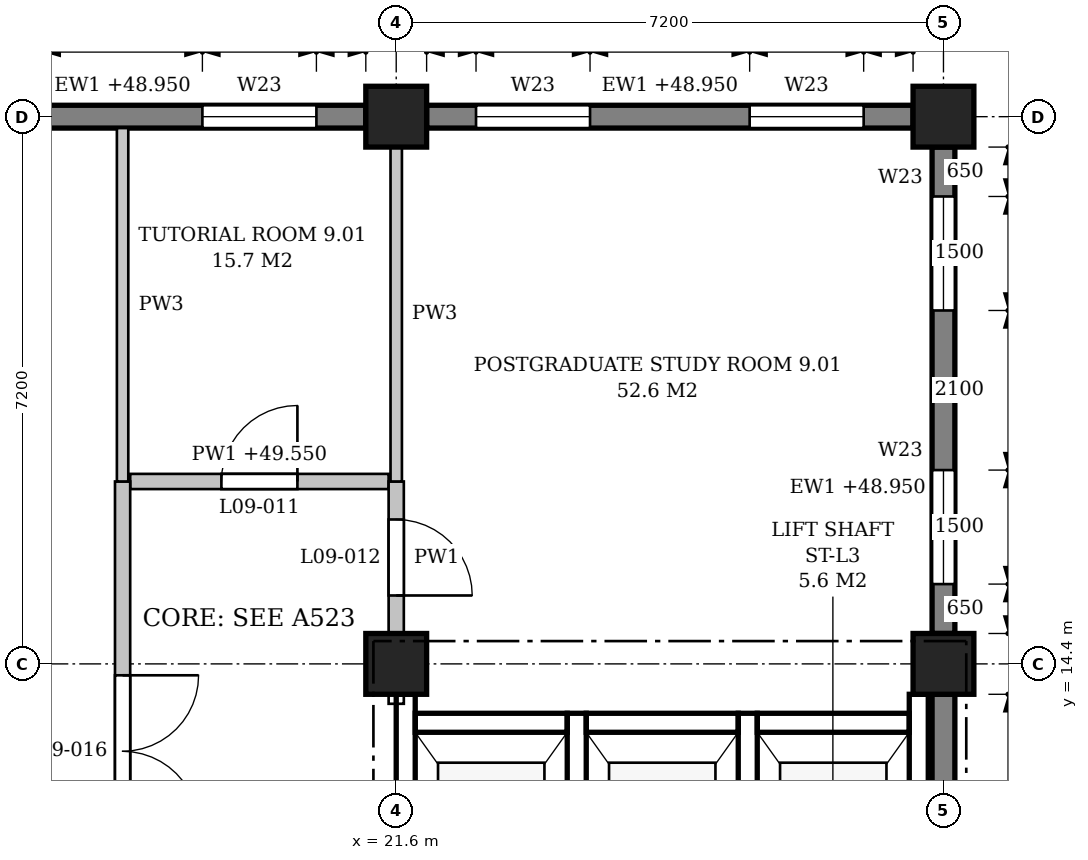
"""IFC4 building model, lengths in metres.
Left out: names, types, materials, properties, quantities, classifications, styles, units other than length and angle.
Written with IfcOpenShell. Run it as: python <this file> out.ifc"""

import sys

from ifc_helpers import new_model, si_unit, direction, frame, frame_2d, origin, origin_2d, place, context, subcontext, project, spatial, polyline, rectangle, outline, extrude, element, fill, save


model = new_model("IFC4")
c1 = context("Model", 3, precision=1e-05, world=origin(), true_north=direction((0.0, 1.0)))
c2 = subcontext(c1, "Body", "Model", "MODEL_VIEW")
j1 = project(units=[si_unit("LENGTHUNIT", "METRE"), si_unit("PLANEANGLEUNIT", "RADIAN")], contexts=[c1])
p1 = place(None, origin())
s1 = spatial("IfcSite", under=j1, at=p1, CompositionType="ELEMENT")
p2 = place(p1, origin())
s2 = spatial("IfcBuilding", under=s1, at=p2, CompositionType="ELEMENT")
p3 = place(p2, frame((0.0, 0.0, 45.3)))
s3 = spatial("IfcBuildingStorey", under=s2, at=p3, CompositionType="ELEMENT", Elevation=45.3)
for number, where, z_axis, x_axis in (
    (1, (21.6, 14.4, 0.0), (0.0, 0.0, 1.0), (1.0, 0.0, 0.0)),
    (2, (21.6, 21.6, 0.0), (0.0, 0.0, 1.0), (1.0, 0.0, 0.0)),
    (3, (28.8, 14.4, 0.0), (0.0, 0.0, 1.0), (1.0, 0.0, 0.0)),
    (4, (28.8, 21.6, 0.0), (0.0, 0.0, 1.0), (1.0, 0.0, 0.0)),
):
    element("IfcColumn", number, at=place(p3, frame(where, z_axis=z_axis, x_axis=x_axis)), inside=s3, PredefinedType="COLUMN", context=c2, shape_type="SweptSolid", body=[
        extrude(rectangle(XDim=0.8, YDim=0.8, at=origin_2d()), origin(), (0.0, 0.0, 1.0), 4.5),
    ])
p4 = place(p3, frame((28.8, 7.6, 0.0), z_axis=(0.0, 0.0, 1.0), x_axis=(0.0, 1.0, 0.0)))
e5 = element("IfcWall", 5, at=p4, inside=s3, PredefinedType="STANDARD", context=c2, shape_type="SweptSolid", body=[
    extrude(rectangle(XDim=6.4, YDim=0.3, at=frame_2d((3.2, 0.0))), origin(), (0.0, 0.0, 1.0), 3.65),
])
p5 = place(p4, frame((0.65, 0.0, 0.9)))
e6 = element("IfcOpeningElement", 6, at=p5, cuts=e5, PredefinedType="OPENING", context=c2, shape_type="SweptSolid", body=[
    extrude(outline(polyline([(0.0, 0.0), (1.5, 0.0), (1.5, 1.95), (0.75, 2.7), (0.0, 1.95), (0.0, 0.0)])), frame((0.0, 0.16, 0.0), z_axis=(0.0, -1.0, 0.0), x_axis=(1.0, 0.0, 0.0)), (0.0, 0.0, 1.0), 0.32),
])
p6 = place(p3, frame((28.8, 14.8, 0.0), z_axis=(0.0, 0.0, 1.0), x_axis=(0.0, 1.0, 0.0)))
e7 = element("IfcWall", 7, at=p6, inside=s3, PredefinedType="STANDARD", context=c2, shape_type="SweptSolid", body=[
    extrude(rectangle(XDim=6.4, YDim=0.3, at=frame_2d((3.2, 0.0))), origin(), (0.0, 0.0, 1.0), 3.65),
])
p7 = place(p6, frame((0.65, 0.0, 0.9)))
e8 = element("IfcOpeningElement", 8, at=p7, cuts=e7, PredefinedType="OPENING", context=c2, shape_type="SweptSolid", body=[
    extrude(outline(polyline([(0.0, 0.0), (1.5, 0.0), (1.5, 1.95), (0.75, 2.7), (0.0, 1.95), (0.0, 0.0)])), frame((0.0, 0.16, 0.0), z_axis=(0.0, -1.0, 0.0), x_axis=(1.0, 0.0, 0.0)), (0.0, 0.0, 1.0), 0.32),
])
p8 = place(p6, frame((4.25, 0.0, 0.9)))
e9 = element("IfcOpeningElement", 9, at=p8, cuts=e7, PredefinedType="OPENING", context=c2, shape_type="SweptSolid", body=[
    extrude(outline(polyline([(0.0, 0.0), (1.5, 0.0), (1.5, 1.95), (0.75, 2.7), (0.0, 1.95), (0.0, 0.0)])), frame((0.0, 0.16, 0.0), z_axis=(0.0, -1.0, 0.0), x_axis=(1.0, 0.0, 0.0)), (0.0, 0.0, 1.0), 0.32),
])
p9 = place(p3, frame((28.4, 21.6, 0.0), z_axis=(0.0, 0.0, 1.0), x_axis=(-1.0, 0.0, 0.0)))
e10 = element("IfcWall", 10, at=p9, inside=s3, PredefinedType="STANDARD", context=c2, shape_type="SweptSolid", body=[
    extrude(rectangle(XDim=6.4, YDim=0.3, at=frame_2d((3.2, 0.0))), origin(), (0.0, 0.0, 1.0), 3.65),
])
p10 = place(p9, frame((0.65, 0.0, 0.9)))
e11 = element("IfcOpeningElement", 11, at=p10, cuts=e10, PredefinedType="OPENING", context=c2, shape_type="SweptSolid", body=[
    extrude(outline(polyline([(0.0, 0.0), (1.5, 0.0), (1.5, 1.95), (0.75, 2.7), (0.0, 1.95), (0.0, 0.0)])), frame((0.0, 0.16, 0.0), z_axis=(0.0, -1.0, 0.0), x_axis=(1.0, 0.0, 0.0)), (0.0, 0.0, 1.0), 0.32),
])
p11 = place(p9, frame((4.25, 0.0, 0.9)))
e12 = element("IfcOpeningElement", 12, at=p11, cuts=e10, PredefinedType="OPENING", context=c2, shape_type="SweptSolid", body=[
    extrude(outline(polyline([(0.0, 0.0), (1.5, 0.0), (1.5, 1.95), (0.75, 2.7), (0.0, 1.95), (0.0, 0.0)])), frame((0.0, 0.16, 0.0), z_axis=(0.0, -1.0, 0.0), x_axis=(1.0, 0.0, 0.0)), (0.0, 0.0, 1.0), 0.32),
])
p12 = place(p3, frame((21.2, 21.6, 0.0), z_axis=(0.0, 0.0, 1.0), x_axis=(-1.0, 0.0, 0.0)))
e13 = element("IfcWall", 13, at=p12, inside=s3, PredefinedType="STANDARD", context=c2, shape_type="SweptSolid", body=[
    extrude(rectangle(XDim=6.4, YDim=0.3, at=frame_2d((3.2, 0.0))), origin(), (0.0, 0.0, 1.0), 3.65),
])
p13 = place(p12, frame((0.65, 0.0, 0.9)))
e14 = element("IfcOpeningElement", 14, at=p13, cuts=e13, PredefinedType="OPENING", context=c2, shape_type="SweptSolid", body=[
    extrude(outline(polyline([(0.0, 0.0), (1.5, 0.0), (1.5, 1.95), (0.75, 2.7), (0.0, 1.95), (0.0, 0.0)])), frame((0.0, 0.16, 0.0), z_axis=(0.0, -1.0, 0.0), x_axis=(1.0, 0.0, 0.0)), (0.0, 0.0, 1.0), 0.32),
])
p14 = place(p12, frame((4.25, 0.0, 0.9)))
e15 = element("IfcOpeningElement", 15, at=p14, cuts=e13, PredefinedType="OPENING", context=c2, shape_type="SweptSolid", body=[
    extrude(outline(polyline([(0.0, 0.0), (1.5, 0.0), (1.5, 1.95), (0.75, 2.7), (0.0, 1.95), (0.0, 0.0)])), frame((0.0, 0.16, 0.0), z_axis=(0.0, -1.0, 0.0), x_axis=(1.0, 0.0, 0.0)), (0.0, 0.0, 1.0), 0.32),
])
p15 = place(p3, frame((21.725, 10.45, -0.25), z_axis=(0.0, 0.0, 1.0), x_axis=(0.0, 1.0, 0.0)))
e16 = element("IfcWall", 16, at=p15, inside=s3, PredefinedType="SHEAR", context=c2, shape_type="SweptSolid", body=[
    extrude(rectangle(XDim=3.55, YDim=0.25, at=frame_2d((1.775, 0.0))), origin(), (0.0, 0.0, 1.0), 3.8),
])
for number, where, z_axis, x_axis in (
    (17, (23.975, 10.45, -0.25), (0.0, 0.0, 1.0), (0.0, 1.0, 0.0)),
    (18, (26.225, 10.45, -0.25), (0.0, 0.0, 1.0), (0.0, 1.0, 0.0)),
):
    element("IfcWall", number, at=place(p3, frame(where, z_axis=z_axis, x_axis=x_axis)), inside=s3, PredefinedType="SHEAR", context=c2, shape_type="SweptSolid", body=[
        extrude(rectangle(XDim=3.3, YDim=0.25, at=frame_2d((1.65, 0.0))), origin(), (0.0, 0.0, 1.0), 4.5),
    ])
p16 = place(p3, frame((28.475, 10.45, -0.25), z_axis=(0.0, 0.0, 1.0), x_axis=(0.0, 1.0, 0.0)))
e19 = element("IfcWall", 19, at=p16, inside=s3, PredefinedType="SHEAR", context=c2, shape_type="SweptSolid", body=[
    extrude(rectangle(XDim=3.55, YDim=0.25, at=frame_2d((1.775, 0.0))), origin(), (0.0, 0.0, 1.0), 4.5),
])
for number, where, z_axis, x_axis in (
    (20, (21.85, 13.625, -0.25), (0.0, 0.0, 1.0), (1.0, 0.0, 0.0)),
    (21, (24.1, 13.625, -0.25), (0.0, 0.0, 1.0), (1.0, 0.0, 0.0)),
    (22, (26.35, 13.625, -0.25), (0.0, 0.0, 1.0), (1.0, 0.0, 0.0)),
):
    element("IfcWall", number, at=place(p3, frame(where, z_axis=z_axis, x_axis=x_axis)), inside=s3, PredefinedType="SHEAR", context=c2, shape_type="SweptSolid", body=[
        extrude(rectangle(XDim=2.0, YDim=0.25, at=frame_2d((1.0, 0.0))), origin(), (0.0, 0.0, 1.0), 4.5),
    ])
p17 = place(p3, frame((18.1, 16.8, 0.0), z_axis=(0.0, 0.0, 1.0), x_axis=(1.0, 0.0, 0.0)))
e23 = element("IfcWall", 23, at=p17, inside=s3, PredefinedType="PARTITIONING", context=c2, shape_type="SweptSolid", body=[
    extrude(outline(polyline([(0.0, 0.0), (3.4, 0.0), (3.4, 3.55), (3.275, 3.55), (3.275, 4.25), (0.0, 4.25), (0.0, 0.0)])), frame((0.0, 0.1, 0.0), z_axis=(0.0, -1.0, 0.0), x_axis=(1.0, 0.0, 0.0)), (0.0, 0.0, 1.0), 0.2),
])
p18 = place(p17, frame((1.2, 0.0, 0.0)))
e24 = element("IfcOpeningElement", 24, at=p18, cuts=e23, PredefinedType="OPENING", context=c2, shape_type="SweptSolid", body=[
    extrude(rectangle(XDim=1.0, YDim=2.1, at=frame_2d((0.5, 1.05))), frame((0.0, 0.11, 0.0), z_axis=(0.0, -1.0, 0.0), x_axis=(1.0, 0.0, 0.0)), (0.0, 0.0, 1.0), 0.22),
])
p19 = place(p3, frame((18.0, 9.7, 0.0), z_axis=(0.0, 0.0, 1.0), x_axis=(0.0, 1.0, 0.0)))
e25 = element("IfcWall", 25, at=p19, inside=s3, PredefinedType="PARTITIONING", context=c2, shape_type="SweptSolid", body=[
    extrude(outline(polyline([(0.0, 0.0), (7.1, 0.0), (7.1, 4.25), (4.925, 4.25), (4.925, 3.55), (4.475, 3.55), (4.475, 4.25), (0.0, 4.25), (0.0, 0.0)])), frame((0.0, 0.1, 0.0), z_axis=(0.0, -1.0, 0.0), x_axis=(1.0, 0.0, 0.0)), (0.0, 0.0, 1.0), 0.2),
])
p20 = place(p19, frame((2.55, 0.0, 0.0)))
e26 = element("IfcOpeningElement", 26, at=p20, cuts=e25, PredefinedType="OPENING", context=c2, shape_type="SweptSolid", body=[
    extrude(rectangle(XDim=2.0, YDim=2.1, at=frame_2d((1.0, 1.05))), frame((0.0, 0.11, 0.0), z_axis=(0.0, -1.0, 0.0), x_axis=(1.0, 0.0, 0.0)), (0.0, 0.0, 1.0), 0.22),
])
p21 = place(p19, frame((0.225, 0.0, 0.0)))
e27 = element("IfcOpeningElement", 27, at=p21, cuts=e25, PredefinedType="OPENING", context=c2, shape_type="SweptSolid", body=[
    extrude(rectangle(XDim=2.0, YDim=2.1, at=frame_2d((1.0, 1.05))), frame((0.0, 0.11, 0.0), z_axis=(0.0, -1.0, 0.0), x_axis=(1.0, 0.0, 0.0)), (0.0, 0.0, 1.0), 0.22),
])
p22 = place(p3, frame((18.0, 16.8, 0.0), z_axis=(0.0, 0.0, 1.0), x_axis=(0.0, 1.0, 0.0)))
e28 = element("IfcWall", 28, at=p22, inside=s3, PredefinedType="PARTITIONING", context=c2, shape_type="SweptSolid", body=[
    extrude(rectangle(XDim=4.65, YDim=0.15, at=frame_2d((2.325, 0.0))), origin(), (0.0, 0.0, 1.0), 3.55),
])
p23 = place(p3, frame((21.6, 13.875, 0.0), z_axis=(0.0, 0.0, 1.0), x_axis=(0.0, 1.0, 0.0)))
e29 = element("IfcWall", 29, at=p23, inside=s3, PredefinedType="PARTITIONING", context=c2, shape_type="SweptSolid", body=[
    extrude(rectangle(XDim=0.125, YDim=0.2, at=frame_2d((0.062, 0.0))), origin(), (0.0, 0.0, 1.0), 3.55),
])
p24 = place(p3, frame((21.6, 14.8, 0.0), z_axis=(0.0, 0.0, 1.0), x_axis=(0.0, 1.0, 0.0)))
e30 = element("IfcWall", 30, at=p24, inside=s3, PredefinedType="PARTITIONING", context=c2, shape_type="SweptSolid", body=[
    extrude(rectangle(XDim=2.0, YDim=0.2, at=frame_2d((1.0, 0.0))), origin(), (0.0, 0.0, 1.0), 3.55),
])
p25 = place(p24, frame((0.5, 0.0, 0.0)))
e31 = element("IfcOpeningElement", 31, at=p25, cuts=e30, PredefinedType="OPENING", context=c2, shape_type="SweptSolid", body=[
    extrude(rectangle(XDim=1.0, YDim=2.1, at=frame_2d((0.5, 1.05))), frame((0.0, 0.11, 0.0), z_axis=(0.0, -1.0, 0.0), x_axis=(1.0, 0.0, 0.0)), (0.0, 0.0, 1.0), 0.22),
])
p26 = place(p3, frame((21.6, 16.8, 0.0), z_axis=(0.0, 0.0, 1.0), x_axis=(0.0, 1.0, 0.0)))
e32 = element("IfcWall", 32, at=p26, inside=s3, PredefinedType="PARTITIONING", context=c2, shape_type="SweptSolid", body=[
    extrude(rectangle(XDim=4.4, YDim=0.15, at=frame_2d((2.2, 0.0))), origin(), (0.0, 0.0, 1.0), 3.55),
])
p27 = place(p7, origin())
e33 = element("IfcWindow", 33, at=p27, inside=s3, PartitioningType="SINGLE_PANEL", PredefinedType="WINDOW", context=c2, shape_type="SweptSolid", body=[
    extrude(outline(polyline([(0.0, 0.0), (1.5, 0.0), (1.5, 1.95), (0.75, 2.7), (0.0, 1.95), (0.0, 0.0)])), frame((0.0, 0.03, 0.0), z_axis=(0.0, -1.0, 0.0), x_axis=(1.0, 0.0, 0.0)), (0.0, 0.0, 1.0), 0.06),
])
fill(e8, e33)
p28 = place(p8, origin())
e34 = element("IfcWindow", 34, at=p28, inside=s3, PartitioningType="SINGLE_PANEL", PredefinedType="WINDOW", context=c2, shape_type="SweptSolid", body=[
    extrude(outline(polyline([(0.0, 0.0), (1.5, 0.0), (1.5, 1.95), (0.75, 2.7), (0.0, 1.95), (0.0, 0.0)])), frame((0.0, 0.03, 0.0), z_axis=(0.0, -1.0, 0.0), x_axis=(1.0, 0.0, 0.0)), (0.0, 0.0, 1.0), 0.06),
])
fill(e9, e34)
p29 = place(p10, origin())
e35 = element("IfcWindow", 35, at=p29, inside=s3, PartitioningType="SINGLE_PANEL", PredefinedType="WINDOW", context=c2, shape_type="SweptSolid", body=[
    extrude(outline(polyline([(0.0, 0.0), (1.5, 0.0), (1.5, 1.95), (0.75, 2.7), (0.0, 1.95), (0.0, 0.0)])), frame((0.0, 0.03, 0.0), z_axis=(0.0, -1.0, 0.0), x_axis=(1.0, 0.0, 0.0)), (0.0, 0.0, 1.0), 0.06),
])
fill(e11, e35)
p30 = place(p11, origin())
e36 = element("IfcWindow", 36, at=p30, inside=s3, PartitioningType="SINGLE_PANEL", PredefinedType="WINDOW", context=c2, shape_type="SweptSolid", body=[
    extrude(outline(polyline([(0.0, 0.0), (1.5, 0.0), (1.5, 1.95), (0.75, 2.7), (0.0, 1.95), (0.0, 0.0)])), frame((0.0, 0.03, 0.0), z_axis=(0.0, -1.0, 0.0), x_axis=(1.0, 0.0, 0.0)), (0.0, 0.0, 1.0), 0.06),
])
fill(e12, e36)
p31 = place(p13, origin())
e37 = element("IfcWindow", 37, at=p31, inside=s3, PartitioningType="SINGLE_PANEL", PredefinedType="WINDOW", context=c2, shape_type="SweptSolid", body=[
    extrude(outline(polyline([(0.0, 0.0), (1.5, 0.0), (1.5, 1.95), (0.75, 2.7), (0.0, 1.95), (0.0, 0.0)])), frame((0.0, 0.03, 0.0), z_axis=(0.0, -1.0, 0.0), x_axis=(1.0, 0.0, 0.0)), (0.0, 0.0, 1.0), 0.06),
])
fill(e14, e37)
p32 = place(p18, origin())
e38 = element("IfcDoor", 38, at=p32, inside=s3, OperationType="SINGLE_SWING_RIGHT", PredefinedType="DOOR", context=c2, shape_type="SweptSolid", body=[
    extrude(rectangle(XDim=1.0, YDim=2.1, at=frame_2d((0.5, 1.05))), frame((0.0, 0.025, 0.0), z_axis=(0.0, -1.0, 0.0), x_axis=(1.0, 0.0, 0.0)), (0.0, 0.0, 1.0), 0.05),
])
fill(e24, e38)
p33 = place(p25, frame((1.0, 0.0, 0.0), z_axis=(0.0, 0.0, 1.0), x_axis=(-1.0, 0.0, 0.0)))
e39 = element("IfcDoor", 39, at=p33, inside=s3, OperationType="SINGLE_SWING_RIGHT", PredefinedType="DOOR", context=c2, shape_type="SweptSolid", body=[
    extrude(rectangle(XDim=1.0, YDim=2.1, at=frame_2d((0.5, 1.05))), frame((0.0, 0.025, 0.0), z_axis=(0.0, -1.0, 0.0), x_axis=(1.0, 0.0, 0.0)), (0.0, 0.0, 1.0), 0.05),
])
fill(e31, e39)
p34 = place(p20, origin())
e40 = element("IfcDoor", 40, at=p34, inside=s3, OperationType="DOUBLE_DOOR_SINGLE_SWING", PredefinedType="DOOR", context=c2, shape_type="SweptSolid", body=[
    extrude(rectangle(XDim=2.0, YDim=2.1, at=frame_2d((1.0, 1.05))), frame((0.0, 0.025, 0.0), z_axis=(0.0, -1.0, 0.0), x_axis=(1.0, 0.0, 0.0)), (0.0, 0.0, 1.0), 0.05),
])
fill(e26, e40)
save(model, sys.argv[1])
